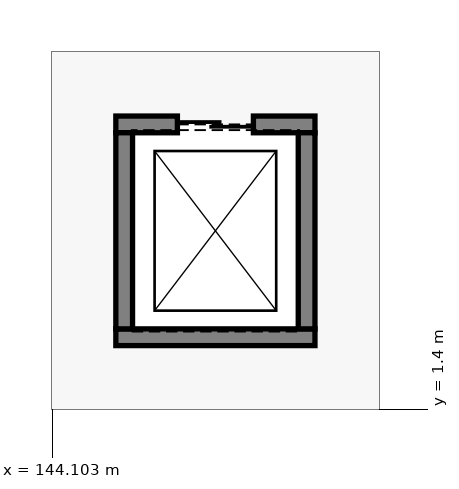
"""IFC4 building model, lengths in metres.
Left out: names, types, materials, properties, quantities, classifications, styles, units other than length and angle.
Written with IfcOpenShell. Run it as: python <this file> out.ifc"""

import sys

from ifc_helpers import new_model, si_unit, direction, frame, frame_2d, origin, place, context, subcontext, project, spatial, rectangle, extrude, element, fill, save


model = new_model("IFC4")
c1 = context("Model", 3, precision=1e-05, world=origin(), true_north=direction((0.0, 1.0)))
c2 = subcontext(c1, "Body", "Model", "MODEL_VIEW")
j1 = project(units=[si_unit("LENGTHUNIT", "METRE"), si_unit("PLANEANGLEUNIT", "RADIAN")], contexts=[c1])
p1 = place(None, origin())
s1 = spatial("IfcSite", under=j1, at=p1, CompositionType="ELEMENT")
p2 = place(p1, origin())
s2 = spatial("IfcBuilding", under=s1, at=p2, CompositionType="ELEMENT")
p3 = place(p2, frame((0.0, 0.0, 9.0)))
s3 = spatial("IfcBuildingStorey", under=s2, at=p3, CompositionType="ELEMENT", Elevation=9.0)
p4 = place(p3, frame((144.94, 2.35, 0.0), z_axis=(0.0, 0.0, 1.0), x_axis=(1.0, 0.0, 0.0)))
e1 = element("IfcWall", 1, at=p4, inside=s3, PredefinedType="SOLIDWALL", context=c2, shape_type="SweptSolid", body=[
    extrude(rectangle(XDim=2.62, YDim=0.22, at=frame_2d((1.31, 0.0))), origin(), (0.0, 0.0, 1.0), 3.92),
])
p5 = place(p3, frame((144.94, 5.15, 0.0), z_axis=(0.0, 0.0, 1.0), x_axis=(1.0, 0.0, 0.0)))
e2 = element("IfcWall", 2, at=p5, inside=s3, PredefinedType="SOLIDWALL", context=c2, shape_type="SweptSolid", body=[
    extrude(rectangle(XDim=2.62, YDim=0.22, at=frame_2d((1.31, 0.0))), origin(), (0.0, 0.0, 1.0), 3.92),
])
p6 = place(p5, frame((0.81, 0.0, 0.0)))
e3 = element("IfcOpeningElement", 3, at=p6, cuts=e2, PredefinedType="OPENING", context=c2, shape_type="SweptSolid", body=[
    extrude(rectangle(XDim=1.0, YDim=2.15, at=frame_2d((0.5, 1.075))), frame((0.0, 0.12, 0.0), z_axis=(0.0, -1.0, 0.0), x_axis=(1.0, 0.0, 0.0)), (0.0, 0.0, 1.0), 0.24),
])
for number, where, z_axis, x_axis in (
    (4, (145.05, 2.46, 0.0), (0.0, 0.0, 1.0), (0.0, 1.0, 0.0)),
    (5, (147.45, 2.46, 0.0), (0.0, 0.0, 1.0), (0.0, 1.0, 0.0)),
):
    element("IfcWall", number, at=place(p3, frame(where, z_axis=z_axis, x_axis=x_axis)), inside=s3, PredefinedType="SOLIDWALL", context=c2, shape_type="SweptSolid", body=[
        extrude(rectangle(XDim=2.58, YDim=0.22, at=frame_2d((1.29, 0.0))), origin(), (0.0, 0.0, 1.0), 3.92),
    ])
p7 = place(p6, origin())
e6 = element("IfcDoor", 6, at=p7, inside=s3, OperationType="SLIDING_TO_LEFT", PredefinedType="DOOR", context=c2, shape_type="SweptSolid", body=[
    extrude(rectangle(XDim=1.0, YDim=2.15, at=frame_2d((0.5, 1.075))), frame((0.0, 0.025, 0.0), z_axis=(0.0, -1.0, 0.0), x_axis=(1.0, 0.0, 0.0)), (0.0, 0.0, 1.0), 0.05),
])
fill(e3, e6)
save(model, sys.argv[1])
